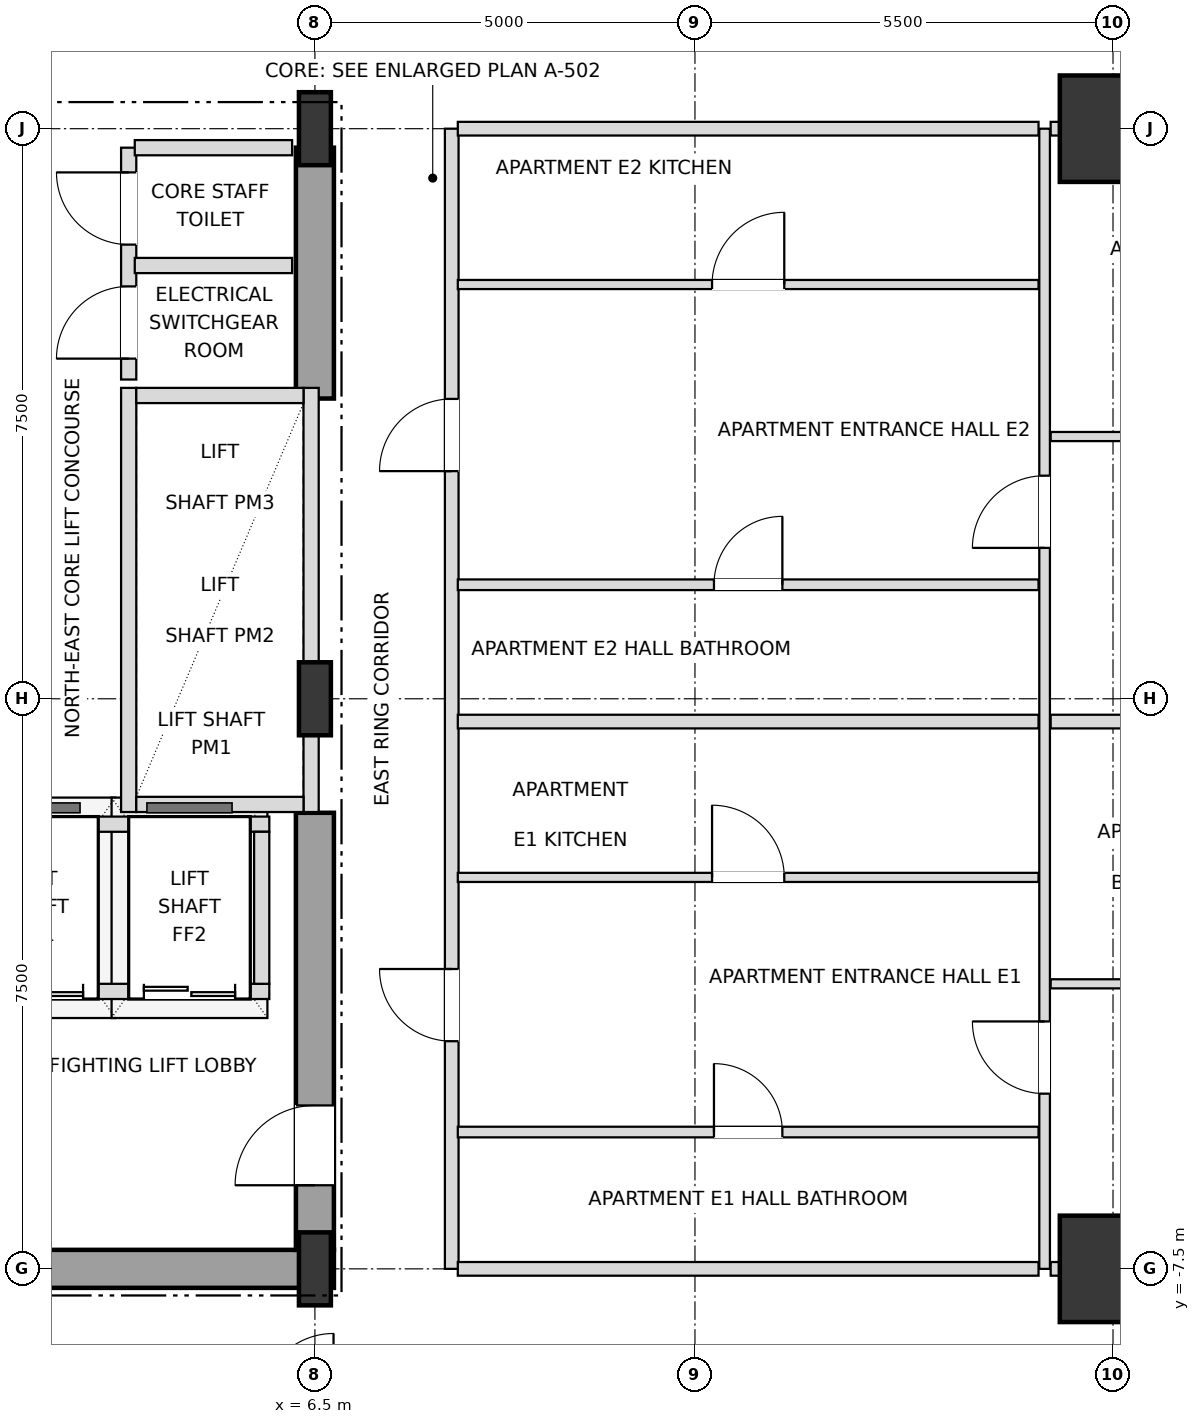
"""IFC4 building model, lengths in metres.
Left out: names, types, materials, properties, quantities, classifications, styles, units other than length and angle.
Written with IfcOpenShell. Run it as: python <this file> out.ifc"""

import sys

from ifc_helpers import new_model, si_unit, direction, frame, frame_2d, origin, origin_2d, place, context, subcontext, project, spatial, rectangle, i_section, extrude, element, fill, save


model = new_model("IFC4")
c1 = context("Model", 3, precision=1e-05, world=origin(), true_north=direction((0.0, 1.0)))
c2 = subcontext(c1, "Body", "Model", "MODEL_VIEW")
j1 = project(units=[si_unit("LENGTHUNIT", "METRE"), si_unit("PLANEANGLEUNIT", "RADIAN")], contexts=[c1])
p1 = place(None, origin())
s1 = spatial("IfcSite", under=j1, at=p1, CompositionType="ELEMENT")
p2 = place(p1, origin())
s2 = spatial("IfcBuilding", under=s1, at=p2, CompositionType="ELEMENT")
p3 = place(p2, frame((0.0, 0.0, 32.4)))
s3 = spatial("IfcBuildingStorey", under=s2, at=p3, CompositionType="ELEMENT", Elevation=32.4)
for number, where, z_axis, x_axis in (
    (1, (6.5, -7.5, 0.0), (0.0, 0.0, 1.0), (1.0, 0.0, 0.0)),
    (2, (6.5, 0.0, 0.0), (0.0, 0.0, 1.0), (1.0, 0.0, 0.0)),
    (3, (6.5, 7.5, 0.0), (0.0, 0.0, 1.0), (1.0, 0.0, 0.0)),
):
    element("IfcColumn", number, at=place(p3, frame(where, z_axis=z_axis, x_axis=x_axis)), inside=s3, PredefinedType="COLUMN", context=c2, shape_type="SweptSolid", body=[
        extrude(i_section(OverallWidth=0.42, OverallDepth=0.96, WebThickness=0.022, FlangeThickness=0.034, at=origin_2d()), origin(), (0.0, 0.0, 1.0), 3.6),
    ])
for number, where, z_axis, x_axis in (
    (4, (17.0, -7.5, 0.0), (0.0, 0.0, 1.0), (1.0, 0.0, 0.0)),
    (5, (17.0, 7.5, 0.0), (0.0, 0.0, 1.0), (1.0, 0.0, 0.0)),
):
    element("IfcColumn", number, at=place(p3, frame(where, z_axis=z_axis, x_axis=x_axis)), inside=s3, PredefinedType="USERDEFINED", context=c2, shape_type="SweptSolid", body=[
        extrude(rectangle(XDim=1.4, YDim=1.4, at=origin_2d()), origin(), (0.0, 0.0, 1.0), 3.6),
    ])
p4 = place(p3, frame((0.0, -7.5, 0.0), z_axis=(0.0, 0.0, 1.0), x_axis=(1.0, 0.0, 0.0)))
e6 = element("IfcWall", 6, at=p4, inside=s3, PredefinedType="SHEAR", context=c2, shape_type="SweptSolid", body=[
    extrude(rectangle(XDim=6.75, YDim=0.5, at=frame_2d((3.375, 0.0))), origin(), (0.0, 0.0, 1.0), 3.38),
])
p5 = place(p3, frame((6.5, -7.25, 0.0), z_axis=(0.0, 0.0, 1.0), x_axis=(0.0, 1.0, 0.0)))
e7 = element("IfcWall", 7, at=p5, inside=s3, PredefinedType="SHEAR", context=c2, shape_type="SweptSolid", body=[
    extrude(rectangle(XDim=5.75, YDim=0.5, at=frame_2d((2.875, 0.0))), origin(), (0.0, 0.0, 1.0), 3.38),
])
p6 = place(p5, frame((0.85, 0.0, 0.0)))
e8 = element("IfcOpeningElement", 8, at=p6, cuts=e7, PredefinedType="OPENING", context=c2, shape_type="SweptSolid", body=[
    extrude(rectangle(XDim=1.05, YDim=2.15, at=frame_2d((0.525, 1.075))), frame((0.0, 0.26, 0.0), z_axis=(0.0, -1.0, 0.0), x_axis=(1.0, 0.0, 0.0)), (0.0, 0.0, 1.0), 0.52),
])
p7 = place(p3, frame((6.5, 3.95, 0.0), z_axis=(0.0, 0.0, 1.0), x_axis=(0.0, 1.0, 0.0)))
e9 = element("IfcWall", 9, at=p7, inside=s3, PredefinedType="SHEAR", context=c2, shape_type="SweptSolid", body=[
    extrude(rectangle(XDim=3.3, YDim=0.5, at=frame_2d((1.65, 0.0))), origin(), (0.0, 0.0, 1.0), 3.38),
])
p8 = place(p3, frame((4.05, -1.49, 0.0), z_axis=(0.0, 0.0, 1.0), x_axis=(0.0, 1.0, 0.0)))
e10 = element("IfcWall", 10, at=p8, inside=s3, PredefinedType="SOLIDWALL", context=c2, shape_type="SweptSolid", body=[
    extrude(rectangle(XDim=5.58, YDim=0.2, at=frame_2d((2.79, 0.0))), origin(), (0.0, 0.0, 1.0), 3.38),
])
p9 = place(p3, frame((6.45, -1.49, 0.0), z_axis=(0.0, 0.0, 1.0), x_axis=(0.0, 1.0, 0.0)))
e11 = element("IfcWall", 11, at=p9, inside=s3, PredefinedType="SOLIDWALL", context=c2, shape_type="SweptSolid", body=[
    extrude(rectangle(XDim=5.58, YDim=0.2, at=frame_2d((2.79, 0.0))), origin(), (0.0, 0.0, 1.0), 2.816),
])
for number, where, z_axis, x_axis in (
    (12, (4.15, -1.39, 0.0), (0.0, 0.0, 1.0), (1.0, 0.0, 0.0)),
    (13, (4.15, 3.99, 0.0), (0.0, 0.0, 1.0), (1.0, 0.0, 0.0)),
):
    element("IfcWall", number, at=place(p3, frame(where, z_axis=z_axis, x_axis=x_axis)), inside=s3, PredefinedType="SOLIDWALL", context=c2, shape_type="SweptSolid", body=[
        extrude(rectangle(XDim=2.2, YDim=0.2, at=frame_2d((1.1, 0.0))), origin(), (0.0, 0.0, 1.0), 3.38),
    ])
p10 = place(p3, frame((1.8, -3.85, 0.0), z_axis=(0.0, 0.0, 1.0), x_axis=(1.0, 0.0, 0.0)))
e14 = element("IfcWall", 14, at=p10, inside=s3, PredefinedType="SOLIDWALL", context=c2, shape_type="SweptSolid", body=[
    extrude(rectangle(XDim=4.1, YDim=0.2, at=frame_2d((2.05, 0.0))), origin(), (0.0, 0.0, 1.0), 3.38),
])
p11 = place(p10, frame((0.45, 0.0, 0.0)))
e15 = element("IfcOpeningElement", 15, at=p11, cuts=e14, PredefinedType="OPENING", context=c2, shape_type="SweptSolid", body=[
    extrude(rectangle(XDim=1.2, YDim=2.2, at=frame_2d((0.6, 1.1))), frame((0.0, 0.11, 0.0), z_axis=(0.0, -1.0, 0.0), x_axis=(1.0, 0.0, 0.0)), (0.0, 0.0, 1.0), 0.22),
])
p12 = place(p10, frame((2.45, 0.0, 0.0)))
e16 = element("IfcOpeningElement", 16, at=p12, cuts=e14, PredefinedType="OPENING", context=c2, shape_type="SweptSolid", body=[
    extrude(rectangle(XDim=1.2, YDim=2.2, at=frame_2d((0.6, 1.1))), frame((0.0, 0.11, 0.0), z_axis=(0.0, -1.0, 0.0), x_axis=(1.0, 0.0, 0.0)), (0.0, 0.0, 1.0), 0.22),
])
p13 = place(p3, frame((1.8, -1.65, 0.0), z_axis=(0.0, 0.0, 1.0), x_axis=(1.0, 0.0, 0.0)))
e17 = element("IfcWall", 17, at=p13, inside=s3, PredefinedType="SOLIDWALL", context=c2, shape_type="SweptSolid", body=[
    extrude(rectangle(XDim=4.1, YDim=0.2, at=frame_2d((2.05, 0.0))), origin(), (0.0, 0.0, 1.0), 3.38),
])
p14 = place(p3, frame((5.8, -3.75, 0.0), z_axis=(0.0, 0.0, 1.0), x_axis=(0.0, 1.0, 0.0)))
e18 = element("IfcWall", 18, at=p14, inside=s3, PredefinedType="SOLIDWALL", context=c2, shape_type="SweptSolid", body=[
    extrude(rectangle(XDim=2.0, YDim=0.2, at=frame_2d((1.0, 0.0))), origin(), (0.0, 0.0, 1.0), 3.38),
])
p15 = place(p3, frame((4.05, 4.2, 0.0), z_axis=(0.0, 0.0, 1.0), x_axis=(0.0, 1.0, 0.0)))
e19 = element("IfcWall", 19, at=p15, inside=s3, PredefinedType="SOLIDWALL", context=c2, shape_type="SweptSolid", body=[
    extrude(rectangle(XDim=3.05, YDim=0.2, at=frame_2d((1.525, 0.0))), origin(), (0.0, 0.0, 1.0), 3.38),
])
p16 = place(p15, frame((0.275, 0.0, 0.0)))
e20 = element("IfcOpeningElement", 20, at=p16, cuts=e19, PredefinedType="OPENING", context=c2, shape_type="SweptSolid", body=[
    extrude(rectangle(XDim=0.95, YDim=2.15, at=frame_2d((0.475, 1.075))), frame((0.0, 0.11, 0.0), z_axis=(0.0, -1.0, 0.0), x_axis=(1.0, 0.0, 0.0)), (0.0, 0.0, 1.0), 0.22),
])
p17 = place(p15, frame((1.775, 0.0, 0.0)))
e21 = element("IfcOpeningElement", 21, at=p17, cuts=e19, PredefinedType="OPENING", context=c2, shape_type="SweptSolid", body=[
    extrude(rectangle(XDim=0.95, YDim=2.15, at=frame_2d((0.475, 1.075))), frame((0.0, 0.11, 0.0), z_axis=(0.0, -1.0, 0.0), x_axis=(1.0, 0.0, 0.0)), (0.0, 0.0, 1.0), 0.22),
])
p18 = place(p3, frame((8.3, -7.5, 0.0), z_axis=(0.0, 0.0, 1.0), x_axis=(0.0, 1.0, 0.0)))
e22 = element("IfcWall", 22, at=p18, inside=s3, PredefinedType="PARTITIONING", context=c2, shape_type="SweptSolid", body=[
    extrude(rectangle(XDim=15.0, YDim=0.18, at=frame_2d((7.5, 0.0))), origin(), (0.0, 0.0, 1.0), 3.38),
])
p19 = place(p18, frame((2.995, 0.0, 0.0)))
e23 = element("IfcOpeningElement", 23, at=p19, cuts=e22, PredefinedType="OPENING", context=c2, shape_type="SweptSolid", body=[
    extrude(rectangle(XDim=0.95, YDim=2.15, at=frame_2d((0.475, 1.075))), frame((0.0, 0.1, 0.0), z_axis=(0.0, -1.0, 0.0), x_axis=(1.0, 0.0, 0.0)), (0.0, 0.0, 1.0), 0.2),
])
p20 = place(p18, frame((10.495, 0.0, 0.0)))
e24 = element("IfcOpeningElement", 24, at=p20, cuts=e22, PredefinedType="OPENING", context=c2, shape_type="SweptSolid", body=[
    extrude(rectangle(XDim=0.95, YDim=2.15, at=frame_2d((0.475, 1.075))), frame((0.0, 0.1, 0.0), z_axis=(0.0, -1.0, 0.0), x_axis=(1.0, 0.0, 0.0)), (0.0, 0.0, 1.0), 0.2),
])
p21 = place(p3, frame((16.1, -7.5, 0.0), z_axis=(0.0, 0.0, 1.0), x_axis=(0.0, 1.0, 0.0)))
e25 = element("IfcWall", 25, at=p21, inside=s3, PredefinedType="PARTITIONING", context=c2, shape_type="SweptSolid", body=[
    extrude(rectangle(XDim=15.0, YDim=0.14, at=frame_2d((7.5, 0.0))), origin(), (0.0, 0.0, 1.0), 3.38),
])
p22 = place(p21, frame((2.305, 0.0, 0.0)))
e26 = element("IfcOpeningElement", 26, at=p22, cuts=e25, PredefinedType="OPENING", context=c2, shape_type="SweptSolid", body=[
    extrude(rectangle(XDim=0.95, YDim=2.1, at=frame_2d((0.475, 1.05))), frame((0.0, 0.08, 0.0), z_axis=(0.0, -1.0, 0.0), x_axis=(1.0, 0.0, 0.0)), (0.0, 0.0, 1.0), 0.16),
])
p23 = place(p21, frame((9.485, 0.0, 0.0)))
e27 = element("IfcOpeningElement", 27, at=p23, cuts=e25, PredefinedType="OPENING", context=c2, shape_type="SweptSolid", body=[
    extrude(rectangle(XDim=0.95, YDim=2.1, at=frame_2d((0.475, 1.05))), frame((0.0, 0.08, 0.0), z_axis=(0.0, -1.0, 0.0), x_axis=(1.0, 0.0, 0.0)), (0.0, 0.0, 1.0), 0.16),
])
p24 = place(p3, frame((8.38, -7.5, 0.0), z_axis=(0.0, 0.0, 1.0), x_axis=(1.0, 0.0, 0.0)))
e28 = element("IfcWall", 28, at=p24, inside=s3, PredefinedType="PARTITIONING", context=c2, shape_type="SweptSolid", body=[
    extrude(rectangle(XDim=7.64, YDim=0.18, at=frame_2d((3.82, 0.0))), origin(), (0.0, 0.0, 1.0), 2.816),
])
p25 = place(p3, frame((16.18, -7.5, 0.0), z_axis=(0.0, 0.0, 1.0), x_axis=(1.0, 0.0, 0.0)))
e29 = element("IfcWall", 29, at=p25, inside=s3, PredefinedType="PARTITIONING", context=c2, shape_type="SweptSolid", body=[
    extrude(rectangle(XDim=5.72, YDim=0.18, at=frame_2d((2.86, 0.0))), origin(), (0.0, 0.0, 1.0), 2.816),
])
p26 = place(p3, frame((8.38, -5.7, 0.0), z_axis=(0.0, 0.0, 1.0), x_axis=(1.0, 0.0, 0.0)))
e30 = element("IfcWall", 30, at=p26, inside=s3, PredefinedType="PARTITIONING", context=c2, shape_type="SweptSolid", body=[
    extrude(rectangle(XDim=7.64, YDim=0.14, at=frame_2d((3.82, 0.0))), origin(), (0.0, 0.0, 1.0), 2.948),
])
p27 = place(p26, frame((3.37, 0.0, 0.0)))
e31 = element("IfcOpeningElement", 31, at=p27, cuts=e30, PredefinedType="OPENING", context=c2, shape_type="SweptSolid", body=[
    extrude(rectangle(XDim=0.9, YDim=2.1, at=frame_2d((0.45, 1.05))), frame((0.0, 0.08, 0.0), z_axis=(0.0, -1.0, 0.0), x_axis=(1.0, 0.0, 0.0)), (0.0, 0.0, 1.0), 0.16),
])
p28 = place(p3, frame((16.18, -3.75, 0.0), z_axis=(0.0, 0.0, 1.0), x_axis=(1.0, 0.0, 0.0)))
e32 = element("IfcWall", 32, at=p28, inside=s3, PredefinedType="PARTITIONING", context=c2, shape_type="SweptSolid", body=[
    extrude(rectangle(XDim=5.64, YDim=0.12, at=frame_2d((2.82, 0.0))), origin(), (0.0, 0.0, 1.0), 2.816),
])
p29 = place(p28, frame((2.37, 0.0, 0.0)))
e33 = element("IfcOpeningElement", 33, at=p29, cuts=e32, PredefinedType="OPENING", context=c2, shape_type="SweptSolid", body=[
    extrude(rectangle(XDim=0.9, YDim=2.1, at=frame_2d((0.45, 1.05))), frame((0.0, 0.07, 0.0), z_axis=(0.0, -1.0, 0.0), x_axis=(1.0, 0.0, 0.0)), (0.0, 0.0, 1.0), 0.14),
])
p30 = place(p3, frame((8.38, -2.35, 0.0), z_axis=(0.0, 0.0, 1.0), x_axis=(1.0, 0.0, 0.0)))
e34 = element("IfcWall", 34, at=p30, inside=s3, PredefinedType="PARTITIONING", context=c2, shape_type="SweptSolid", body=[
    extrude(rectangle(XDim=7.64, YDim=0.12, at=frame_2d((3.82, 0.0))), origin(), (0.0, 0.0, 1.0), 2.948),
])
p31 = place(p30, frame((3.345, 0.0, 0.0)))
e35 = element("IfcOpeningElement", 35, at=p31, cuts=e34, PredefinedType="OPENING", context=c2, shape_type="SweptSolid", body=[
    extrude(rectangle(XDim=0.95, YDim=2.1, at=frame_2d((0.475, 1.05))), frame((0.0, 0.07, 0.0), z_axis=(0.0, -1.0, 0.0), x_axis=(1.0, 0.0, 0.0)), (0.0, 0.0, 1.0), 0.14),
])
p32 = place(p3, frame((8.38, -0.3, 0.0), z_axis=(0.0, 0.0, 1.0), x_axis=(1.0, 0.0, 0.0)))
e36 = element("IfcWall", 36, at=p32, inside=s3, PredefinedType="PARTITIONING", context=c2, shape_type="SweptSolid", body=[
    extrude(rectangle(XDim=7.64, YDim=0.18, at=frame_2d((3.82, 0.0))), origin(), (0.0, 0.0, 1.0), 2.948),
])
p33 = place(p3, frame((16.18, -0.3, 0.0), z_axis=(0.0, 0.0, 1.0), x_axis=(1.0, 0.0, 0.0)))
e37 = element("IfcWall", 37, at=p33, inside=s3, PredefinedType="PARTITIONING", context=c2, shape_type="SweptSolid", body=[
    extrude(rectangle(XDim=5.64, YDim=0.18, at=frame_2d((2.82, 0.0))), origin(), (0.0, 0.0, 1.0), 2.816),
])
p34 = place(p3, frame((8.38, 1.5, 0.0), z_axis=(0.0, 0.0, 1.0), x_axis=(1.0, 0.0, 0.0)))
e38 = element("IfcWall", 38, at=p34, inside=s3, PredefinedType="PARTITIONING", context=c2, shape_type="SweptSolid", body=[
    extrude(rectangle(XDim=7.64, YDim=0.14, at=frame_2d((3.82, 0.0))), origin(), (0.0, 0.0, 1.0), 2.948),
])
p35 = place(p34, frame((3.37, 0.0, 0.0)))
e39 = element("IfcOpeningElement", 39, at=p35, cuts=e38, PredefinedType="OPENING", context=c2, shape_type="SweptSolid", body=[
    extrude(rectangle(XDim=0.9, YDim=2.1, at=frame_2d((0.45, 1.05))), frame((0.0, 0.08, 0.0), z_axis=(0.0, -1.0, 0.0), x_axis=(1.0, 0.0, 0.0)), (0.0, 0.0, 1.0), 0.16),
])
p36 = place(p3, frame((16.18, 3.45, 0.0), z_axis=(0.0, 0.0, 1.0), x_axis=(1.0, 0.0, 0.0)))
e40 = element("IfcWall", 40, at=p36, inside=s3, PredefinedType="PARTITIONING", context=c2, shape_type="SweptSolid", body=[
    extrude(rectangle(XDim=5.64, YDim=0.12, at=frame_2d((2.82, 0.0))), origin(), (0.0, 0.0, 1.0), 2.816),
])
p37 = place(p36, frame((2.37, 0.0, 0.0)))
e41 = element("IfcOpeningElement", 41, at=p37, cuts=e40, PredefinedType="OPENING", context=c2, shape_type="SweptSolid", body=[
    extrude(rectangle(XDim=0.9, YDim=2.1, at=frame_2d((0.45, 1.05))), frame((0.0, 0.07, 0.0), z_axis=(0.0, -1.0, 0.0), x_axis=(1.0, 0.0, 0.0)), (0.0, 0.0, 1.0), 0.14),
])
p38 = place(p3, frame((8.38, 5.45, 0.0), z_axis=(0.0, 0.0, 1.0), x_axis=(1.0, 0.0, 0.0)))
e42 = element("IfcWall", 42, at=p38, inside=s3, PredefinedType="PARTITIONING", context=c2, shape_type="SweptSolid", body=[
    extrude(rectangle(XDim=7.64, YDim=0.12, at=frame_2d((3.82, 0.0))), origin(), (0.0, 0.0, 1.0), 2.948),
])
p39 = place(p38, frame((3.345, 0.0, 0.0)))
e43 = element("IfcOpeningElement", 43, at=p39, cuts=e42, PredefinedType="OPENING", context=c2, shape_type="SweptSolid", body=[
    extrude(rectangle(XDim=0.95, YDim=2.1, at=frame_2d((0.475, 1.05))), frame((0.0, 0.07, 0.0), z_axis=(0.0, -1.0, 0.0), x_axis=(1.0, 0.0, 0.0)), (0.0, 0.0, 1.0), 0.14),
])
for number, where, z_axis, x_axis in (
    (44, (4.13, 5.7, 0.0), (0.0, 0.0, 1.0), (1.0, 0.0, 0.0)),
    (45, (4.13, 7.25, 0.0), (0.0, 0.0, 1.0), (1.0, 0.0, 0.0)),
):
    element("IfcWall", number, at=place(p3, frame(where, z_axis=z_axis, x_axis=x_axis)), inside=s3, PredefinedType="SOLIDWALL", context=c2, shape_type="SweptSolid", body=[
        extrude(rectangle(XDim=2.07, YDim=0.2, at=frame_2d((1.035, 0.0))), origin(), (0.0, 0.0, 1.0), 3.38),
    ])
p40 = place(p3, frame((8.38, 7.5, 0.0), z_axis=(0.0, 0.0, 1.0), x_axis=(1.0, 0.0, 0.0)))
e46 = element("IfcWall", 46, at=p40, inside=s3, PredefinedType="PARTITIONING", context=c2, shape_type="SweptSolid", body=[
    extrude(rectangle(XDim=7.64, YDim=0.18, at=frame_2d((3.82, 0.0))), origin(), (0.0, 0.0, 1.0), 2.816),
])
p41 = place(p3, frame((16.18, 7.5, 0.0), z_axis=(0.0, 0.0, 1.0), x_axis=(1.0, 0.0, 0.0)))
e47 = element("IfcWall", 47, at=p41, inside=s3, PredefinedType="PARTITIONING", context=c2, shape_type="SweptSolid", body=[
    extrude(rectangle(XDim=5.72, YDim=0.18, at=frame_2d((2.86, 0.0))), origin(), (0.0, 0.0, 1.0), 2.816),
])
p42 = place(p6, origin())
e48 = element("IfcDoor", 48, at=p42, inside=s3, OperationType="SINGLE_SWING_LEFT", PredefinedType="DOOR", context=c2, shape_type="SweptSolid", body=[
    extrude(rectangle(XDim=1.05, YDim=2.15, at=frame_2d((0.525, 1.075))), frame((0.0, 0.025, 0.0), z_axis=(0.0, -1.0, 0.0), x_axis=(1.0, 0.0, 0.0)), (0.0, 0.0, 1.0), 0.05),
])
fill(e8, e48)
p43 = place(p11, origin())
e49 = element("IfcDoor", 49, at=p43, inside=s3, OperationType="DOUBLE_DOOR_SLIDING", PredefinedType="DOOR", context=c2, shape_type="SweptSolid", body=[
    extrude(rectangle(XDim=1.2, YDim=2.2, at=frame_2d((0.6, 1.1))), frame((0.0, 0.025, 0.0), z_axis=(0.0, -1.0, 0.0), x_axis=(1.0, 0.0, 0.0)), (0.0, 0.0, 1.0), 0.05),
])
fill(e15, e49)
p44 = place(p12, origin())
e50 = element("IfcDoor", 50, at=p44, inside=s3, OperationType="DOUBLE_DOOR_SLIDING", PredefinedType="DOOR", context=c2, shape_type="SweptSolid", body=[
    extrude(rectangle(XDim=1.2, YDim=2.2, at=frame_2d((0.6, 1.1))), frame((0.0, 0.025, 0.0), z_axis=(0.0, -1.0, 0.0), x_axis=(1.0, 0.0, 0.0)), (0.0, 0.0, 1.0), 0.05),
])
fill(e16, e50)
p45 = place(p16, origin())
e51 = element("IfcDoor", 51, at=p45, inside=s3, OperationType="SINGLE_SWING_LEFT", PredefinedType="DOOR", context=c2, shape_type="SweptSolid", body=[
    extrude(rectangle(XDim=0.95, YDim=2.15, at=frame_2d((0.475, 1.075))), frame((0.0, 0.025, 0.0), z_axis=(0.0, -1.0, 0.0), x_axis=(1.0, 0.0, 0.0)), (0.0, 0.0, 1.0), 0.05),
])
fill(e20, e51)
p46 = place(p17, origin())
e52 = element("IfcDoor", 52, at=p46, inside=s3, OperationType="SINGLE_SWING_RIGHT", PredefinedType="DOOR", context=c2, shape_type="SweptSolid", body=[
    extrude(rectangle(XDim=0.95, YDim=2.15, at=frame_2d((0.475, 1.075))), frame((0.0, 0.025, 0.0), z_axis=(0.0, -1.0, 0.0), x_axis=(1.0, 0.0, 0.0)), (0.0, 0.0, 1.0), 0.05),
])
fill(e21, e52)
p47 = place(p27, origin())
e53 = element("IfcDoor", 53, at=p47, inside=s3, OperationType="SINGLE_SWING_LEFT", PredefinedType="DOOR", context=c2, shape_type="SweptSolid", body=[
    extrude(rectangle(XDim=0.9, YDim=2.1, at=frame_2d((0.45, 1.05))), frame((0.0, 0.025, 0.0), z_axis=(0.0, -1.0, 0.0), x_axis=(1.0, 0.0, 0.0)), (0.0, 0.0, 1.0), 0.05),
])
fill(e31, e53)
p48 = place(p19, origin())
e54 = element("IfcDoor", 54, at=p48, inside=s3, OperationType="SINGLE_SWING_RIGHT", PredefinedType="DOOR", context=c2, shape_type="SweptSolid", body=[
    extrude(rectangle(XDim=0.95, YDim=2.15, at=frame_2d((0.475, 1.075))), frame((0.0, 0.025, 0.0), z_axis=(0.0, -1.0, 0.0), x_axis=(1.0, 0.0, 0.0)), (0.0, 0.0, 1.0), 0.05),
])
fill(e23, e54)
p49 = place(p31, origin())
e55 = element("IfcDoor", 55, at=p49, inside=s3, OperationType="SINGLE_SWING_LEFT", PredefinedType="DOOR", context=c2, shape_type="SweptSolid", body=[
    extrude(rectangle(XDim=0.95, YDim=2.1, at=frame_2d((0.475, 1.05))), frame((0.0, 0.025, 0.0), z_axis=(0.0, -1.0, 0.0), x_axis=(1.0, 0.0, 0.0)), (0.0, 0.0, 1.0), 0.05),
])
fill(e35, e55)
p50 = place(p22, origin())
e56 = element("IfcDoor", 56, at=p50, inside=s3, OperationType="SINGLE_SWING_RIGHT", PredefinedType="DOOR", context=c2, shape_type="SweptSolid", body=[
    extrude(rectangle(XDim=0.95, YDim=2.1, at=frame_2d((0.475, 1.05))), frame((0.0, 0.025, 0.0), z_axis=(0.0, -1.0, 0.0), x_axis=(1.0, 0.0, 0.0)), (0.0, 0.0, 1.0), 0.05),
])
fill(e26, e56)
p51 = place(p35, origin())
e57 = element("IfcDoor", 57, at=p51, inside=s3, OperationType="SINGLE_SWING_RIGHT", PredefinedType="DOOR", context=c2, shape_type="SweptSolid", body=[
    extrude(rectangle(XDim=0.9, YDim=2.1, at=frame_2d((0.45, 1.05))), frame((0.0, 0.025, 0.0), z_axis=(0.0, -1.0, 0.0), x_axis=(1.0, 0.0, 0.0)), (0.0, 0.0, 1.0), 0.05),
])
fill(e39, e57)
p52 = place(p20, origin())
e58 = element("IfcDoor", 58, at=p52, inside=s3, OperationType="SINGLE_SWING_LEFT", PredefinedType="DOOR", context=c2, shape_type="SweptSolid", body=[
    extrude(rectangle(XDim=0.95, YDim=2.15, at=frame_2d((0.475, 1.075))), frame((0.0, 0.025, 0.0), z_axis=(0.0, -1.0, 0.0), x_axis=(1.0, 0.0, 0.0)), (0.0, 0.0, 1.0), 0.05),
])
fill(e24, e58)
p53 = place(p39, origin())
e59 = element("IfcDoor", 59, at=p53, inside=s3, OperationType="SINGLE_SWING_RIGHT", PredefinedType="DOOR", context=c2, shape_type="SweptSolid", body=[
    extrude(rectangle(XDim=0.95, YDim=2.1, at=frame_2d((0.475, 1.05))), frame((0.0, 0.025, 0.0), z_axis=(0.0, -1.0, 0.0), x_axis=(1.0, 0.0, 0.0)), (0.0, 0.0, 1.0), 0.05),
])
fill(e43, e59)
p54 = place(p23, origin())
e60 = element("IfcDoor", 60, at=p54, inside=s3, OperationType="SINGLE_SWING_LEFT", PredefinedType="DOOR", context=c2, shape_type="SweptSolid", body=[
    extrude(rectangle(XDim=0.95, YDim=2.1, at=frame_2d((0.475, 1.05))), frame((0.0, 0.025, 0.0), z_axis=(0.0, -1.0, 0.0), x_axis=(1.0, 0.0, 0.0)), (0.0, 0.0, 1.0), 0.05),
])
fill(e27, e60)
save(model, sys.argv[1])
